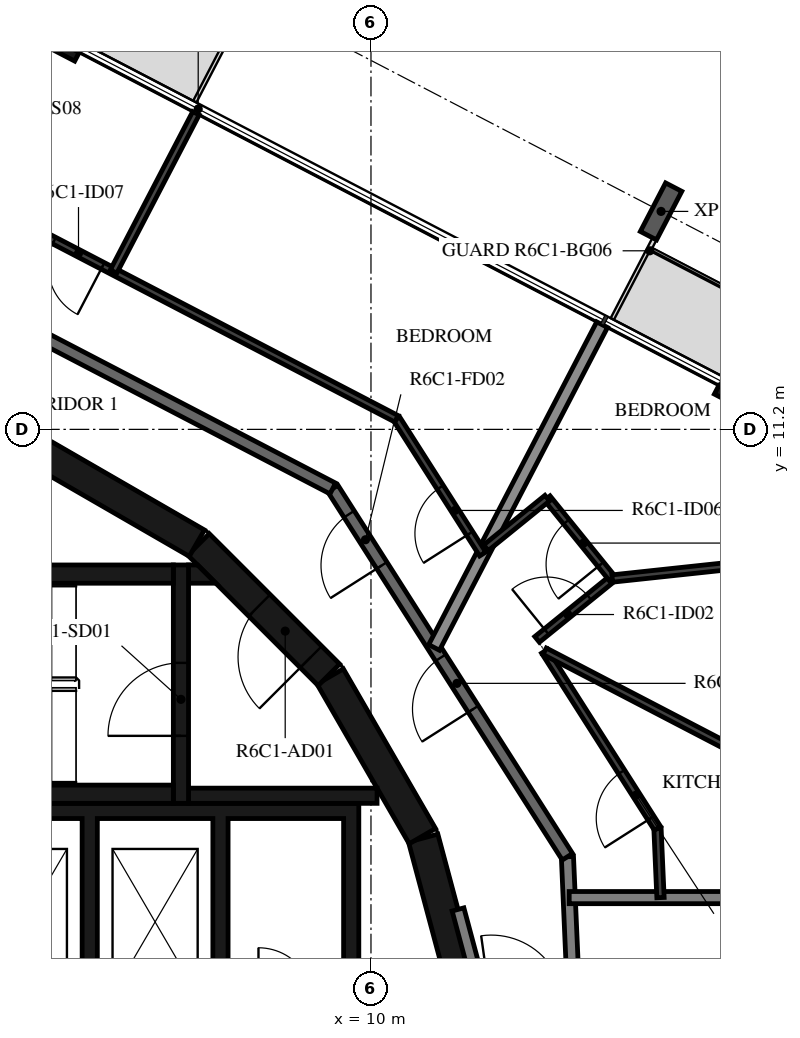
"""IFC4 building model, lengths in metres.
Left out: names, types, materials, properties, quantities, classifications, styles, units other than length and angle.
Written with IfcOpenShell. Run it as: python <this file> out.ifc"""

import sys

from ifc_helpers import new_model, si_unit, direction, frame, frame_2d, origin, origin_2d, place, context, subcontext, project, spatial, polyline, rectangle, i_section, outline, extrude, element, fill, save


model = new_model("IFC4")
c1 = context("Model", 3, precision=1e-05, world=origin(), true_north=direction((0.0, 1.0)))
c2 = subcontext(c1, "Body", "Model", "MODEL_VIEW")
j1 = project(units=[si_unit("LENGTHUNIT", "METRE"), si_unit("PLANEANGLEUNIT", "RADIAN")], contexts=[c1])
p1 = place(None, origin())
s1 = spatial("IfcSite", under=j1, at=p1, CompositionType="ELEMENT")
p2 = place(p1, origin())
s2 = spatial("IfcBuilding", under=s1, at=p2, CompositionType="ELEMENT")
p3 = place(p2, frame((0.0, 0.0, 251.2)))
s3 = spatial("IfcBuildingStorey", under=s2, at=p3, CompositionType="ELEMENT", Elevation=251.2)
p4 = place(p3, frame((14.771, 14.784, -0.38), z_axis=(0.0, 0.0, 1.0), x_axis=(0.887010710334, -0.461748849216, 0.0)))
e1 = element("IfcColumn", 1, at=p4, inside=s3, PredefinedType="COLUMN", context=c2, shape_type="SweptSolid", body=[
    extrude(i_section(OverallWidth=0.3, OverallDepth=0.9, WebThickness=0.019, FlangeThickness=0.035, FilletRadius=0.03, at=origin_2d()), origin(), (0.0, 0.0, 1.0), 3.5),
])
p5 = place(p3, frame((18.523, 10.374, 0.0), z_axis=(0.0, 0.0, 1.0), x_axis=(-0.887014349583, 0.461741858221, 0.0)))
e2 = element("IfcWall", 2, at=p5, inside=s3, PredefinedType="STANDARD", context=c2, shape_type="SweptSolid", body=[
    extrude(rectangle(XDim=3.2, YDim=0.16, at=frame_2d((1.6, 0.0))), origin(), (0.0, 0.0, 1.0), 3.12),
])
p6 = place(p5, frame((0.4, 0.0, 0.0)))
e3 = element("IfcOpeningElement", 3, at=p6, cuts=e2, PredefinedType="OPENING", context=c2, shape_type="SweptSolid", body=[
    extrude(rectangle(XDim=2.4, YDim=2.4, at=frame_2d((1.2, 1.2))), frame((0.0, 0.09, 0.0), z_axis=(0.0, -1.0, 0.0), x_axis=(1.0, 0.0, 0.0)), (0.0, 0.0, 1.0), 0.18),
])
p7 = place(p3, frame((5.164, 17.327, 0.0), z_axis=(0.0, 0.0, 1.0), x_axis=(-0.886983100078, 0.461801884119, 0.0)))
e4 = element("IfcWall", 4, at=p7, inside=s3, PredefinedType="STANDARD", context=c2, shape_type="SweptSolid", body=[
    extrude(rectangle(XDim=3.2, YDim=0.16, at=frame_2d((1.6, 0.0))), origin(), (0.0, 0.0, 1.0), 3.12),
])
p8 = place(p7, frame((0.4, 0.0, 0.0)))
e5 = element("IfcOpeningElement", 5, at=p8, cuts=e4, PredefinedType="OPENING", context=c2, shape_type="SweptSolid", body=[
    extrude(rectangle(XDim=2.4, YDim=2.4, at=frame_2d((1.2, 1.2))), frame((0.0, 0.09, 0.0), z_axis=(0.0, -1.0, 0.0), x_axis=(1.0, 0.0, 0.0)), (0.0, 0.0, 1.0), 0.18),
])
for number, where, z_axis, x_axis in (
    (6, (11.643, 1.55, 0.0), (0.0, 0.0, 1.0), (-0.259, 0.966, 0.0)),
    (7, (10.845, 4.51, 0.0), (0.0, 0.0, 1.0), (-0.5, 0.866, 0.0)),
):
    element("IfcWall", number, at=place(p3, frame(where, z_axis=z_axis, x_axis=x_axis)), inside=s3, PredefinedType="SHEAR", context=c2, shape_type="SweptSolid", body=[
        extrude(rectangle(XDim=3.033, YDim=0.5, at=frame_2d((1.516, 0.0))), origin(), (0.0, 0.0, 1.0), 3.12),
    ])
p9 = place(p3, frame((9.308, 7.164, 0.0), z_axis=(0.0, 0.0, 1.0), x_axis=(-0.707106781187, 0.707106781187, 0.0)))
e8 = element("IfcWall", 8, at=p9, inside=s3, PredefinedType="SHEAR", context=c2, shape_type="SweptSolid", body=[
    extrude(rectangle(XDim=3.032, YDim=0.5, at=frame_2d((1.516, 0.0))), origin(), (0.0, 0.0, 1.0), 3.12),
])
p10 = place(p9, frame((0.416, 0.0, 0.0)))
e9 = element("IfcOpeningElement", 9, at=p10, cuts=e8, PredefinedType="OPENING", context=c2, shape_type="SweptSolid", body=[
    extrude(rectangle(XDim=1.2, YDim=2.1, at=frame_2d((0.6, 1.05))), frame((0.0, 0.26, 0.0), z_axis=(0.0, -1.0, 0.0), x_axis=(1.0, 0.0, 0.0)), (0.0, 0.0, 1.0), 0.52),
])
p11 = place(p3, frame((7.137, 9.329, 0.0), z_axis=(0.0, 0.0, 1.0), x_axis=(-0.865975092491, 0.500087131594, 0.0)))
e10 = element("IfcWall", 10, at=p11, inside=s3, PredefinedType="SHEAR", context=c2, shape_type="SweptSolid", body=[
    extrude(rectangle(XDim=3.033, YDim=0.5, at=frame_2d((1.516, 0.0))), origin(), (0.0, 0.0, 1.0), 3.12),
])
for number, where, z_axis, x_axis in (
    (11, (0.0, 5.2, 0.0), (0.0, 0.0, 1.0), (1.0, 0.0, 0.0)),
    (12, (0.0, 8.82, 0.0), (0.0, 0.0, 1.0), (1.0, 0.0, 0.0)),
):
    element("IfcWall", number, at=place(p3, frame(where, z_axis=z_axis, x_axis=x_axis)), inside=s3, PredefinedType="SHEAR", context=c2, shape_type="SweptSolid", body=[
        extrude(rectangle(XDim=6.75, YDim=0.3, at=frame_2d((3.375, 0.0))), origin(), (0.0, 0.0, 1.0), 3.12),
    ])
p12 = place(p3, frame((6.875, 5.05, 0.0), z_axis=(0.0, 0.0, 1.0), x_axis=(0.0, 1.0, 0.0)))
e13 = element("IfcWall", 13, at=p12, inside=s3, PredefinedType="SHEAR", context=c2, shape_type="SweptSolid", body=[
    extrude(rectangle(XDim=3.92, YDim=0.25, at=frame_2d((1.96, 0.0))), origin(), (0.0, 0.0, 1.0), 3.12),
])
p13 = place(p12, frame((1.11, 0.0, 0.0)))
e14 = element("IfcOpeningElement", 14, at=p13, cuts=e13, PredefinedType="OPENING", context=c2, shape_type="SweptSolid", body=[
    extrude(rectangle(XDim=1.2, YDim=2.1, at=frame_2d((0.6, 1.05))), frame((0.0, 0.135, 0.0), z_axis=(0.0, -1.0, 0.0), x_axis=(1.0, 0.0, 0.0)), (0.0, 0.0, 1.0), 0.27),
])
p14 = place(p3, frame((7.0, 5.175, 0.0), z_axis=(0.0, 0.0, 1.0), x_axis=(1.0, 0.0, 0.0)))
e15 = element("IfcWall", 15, at=p14, inside=s3, PredefinedType="SHEAR", context=c2, shape_type="SweptSolid", body=[
    extrude(rectangle(XDim=3.1, YDim=0.25, at=frame_2d((1.55, 0.0))), origin(), (0.0, 0.0, 1.0), 3.12),
])
p15 = place(p3, origin())
e16 = element("IfcWall", 16, at=p15, inside=s3, PredefinedType="SHEAR", context=c2, shape_type="SweptSolid", body=[
    extrude(outline(polyline([(7.448, 8.67), (7.0, 8.67), (7.0, 8.97), (7.148, 8.97), (7.448, 8.67)])), origin(), (0.0, 0.0, 1.0), 3.12),
])
p16 = place(p3, origin())
e17 = element("IfcWall", 17, at=p16, inside=s3, PredefinedType="SHEAR", context=c2, shape_type="SweptSolid", body=[
    extrude(outline(polyline([(-9.55, 4.8), (-1.2, 4.8), (-1.2, 1.9), (-0.95, 1.9), (-0.95, 4.8), (0.95, 4.8), (0.95, 1.9), (1.2, 1.9), (1.2, 4.8), (3.1, 4.8), (3.1, 1.9), (3.35, 1.9), (3.35, 4.8), (5.25, 4.8), (5.25, 1.9), (5.5, 1.9), (5.5, 4.8), (7.4, 4.8), (7.4, 1.9), (7.65, 1.9), (7.65, 4.8), (9.55, 4.8), (9.55, 1.9), (9.8, 1.9), (9.8, 4.8), (9.8, 5.05), (-9.8, 5.05), (-9.8, 4.8), (-9.8, 1.9), (-9.55, 1.9), (-9.55, 4.8)])), origin(), (0.0, 0.0, 1.0), 3.12),
])
p17 = place(p3, frame((11.87, 1.668, 0.0), z_axis=(0.0, 0.0, 1.0), x_axis=(-0.258836880648, 0.965921047093, 0.0)))
e18 = element("IfcWall", 18, at=p17, inside=s3, PredefinedType="STANDARD", context=c2, shape_type="SweptSolid", body=[
    extrude(rectangle(XDim=1.695, YDim=0.2, at=frame_2d((0.848, 0.0))), origin(), (0.0, 0.0, 1.0), 3.12),
])
p18 = place(p3, frame((13.331, 1.874, 0.0), z_axis=(0.0, 0.0, 1.0), x_axis=(-0.043621457762, 0.999048131184, 0.0)))
e19 = element("IfcWall", 19, at=p18, inside=s3, PredefinedType="STANDARD", context=c2, shape_type="SweptSolid", body=[
    extrude(rectangle(XDim=2.3, YDim=0.2, at=frame_2d((1.15, 0.0))), origin(), (0.0, 0.0, 1.0), 3.12),
])
p19 = place(p3, frame((13.231, 4.172, 0.0), z_axis=(0.0, 0.0, 1.0), x_axis=(-0.537304397561, 0.843388394728, 0.0)))
e20 = element("IfcWall", 20, at=p19, inside=s3, PredefinedType="STANDARD", context=c2, shape_type="SweptSolid", body=[
    extrude(rectangle(XDim=7.181, YDim=0.2, at=frame_2d((3.59, 0.0))), origin(), (0.0, 0.0, 1.0), 3.12),
])
p20 = place(p19, frame((2.881, 0.0, 0.0)))
e21 = element("IfcOpeningElement", 21, at=p20, cuts=e20, PredefinedType="OPENING", context=c2, shape_type="SweptSolid", body=[
    extrude(rectangle(XDim=1.0, YDim=2.1, at=frame_2d((0.5, 1.05))), frame((0.0, 0.11, 0.0), z_axis=(0.0, -1.0, 0.0), x_axis=(1.0, 0.0, 0.0)), (0.0, 0.0, 1.0), 0.22),
])
p21 = place(p19, frame((5.681, 0.0, 0.0)))
e22 = element("IfcOpeningElement", 22, at=p21, cuts=e20, PredefinedType="OPENING", context=c2, shape_type="SweptSolid", body=[
    extrude(rectangle(XDim=1.0, YDim=2.1, at=frame_2d((0.5, 1.05))), frame((0.0, 0.11, 0.0), z_axis=(0.0, -1.0, 0.0), x_axis=(1.0, 0.0, 0.0)), (0.0, 0.0, 1.0), 0.22),
])
p22 = place(p3, frame((9.372, 10.228, 0.0), z_axis=(0.0, 0.0, 1.0), x_axis=(-0.887005184532, 0.461759464021, 0.0)))
e23 = element("IfcWall", 23, at=p22, inside=s3, PredefinedType="STANDARD", context=c2, shape_type="SweptSolid", body=[
    extrude(rectangle(XDim=7.181, YDim=0.2, at=frame_2d((3.591, 0.0))), origin(), (0.0, 0.0, 1.0), 3.12),
])
p23 = place(p3, frame((17.321, 3.5, 0.0), z_axis=(0.0, 0.0, 1.0), x_axis=(-1.0, 0.0, 0.0)))
e24 = element("IfcWall", 24, at=p23, inside=s3, PredefinedType="STANDARD", context=c2, shape_type="SweptSolid", body=[
    extrude(rectangle(XDim=4.061, YDim=0.2, at=frame_2d((2.03, 0.0))), origin(), (0.0, 0.0, 1.0), 3.12),
])
p24 = place(p3, frame((13.801, 12.922, 0.0), z_axis=(0.0, 0.0, 1.0), x_axis=(-0.461726485624, -0.887022351733, 0.0)))
e25 = element("IfcWall", 25, at=p24, inside=s3, PredefinedType="STANDARD", context=c2, shape_type="SweptSolid", body=[
    extrude(rectangle(XDim=5.984, YDim=0.2, at=frame_2d((2.992, 0.0))), origin(), (0.0, 0.0, 1.0), 2.73),
])
p25 = place(p3, frame((14.761, 3.5, 0.0), z_axis=(0.0, 0.0, 1.0), x_axis=(-0.04369750018, 0.999044808043, 0.0)))
e26 = element("IfcWall", 26, at=p25, inside=s3, PredefinedType="PARTITIONING", context=c2, shape_type="SweptSolid", body=[
    extrude(rectangle(XDim=1.14, YDim=0.12, at=frame_2d((0.57, 0.0))), origin(), (0.0, 0.0, 1.0), 3.12),
])
p26 = place(p3, frame((14.712, 4.639, 0.0), z_axis=(0.0, 0.0, 1.0), x_axis=(-0.537287126609, 0.843399397427, 0.0)))
e27 = element("IfcWall", 27, at=p26, inside=s3, PredefinedType="PARTITIONING", context=c2, shape_type="SweptSolid", body=[
    extrude(rectangle(XDim=3.453, YDim=0.12, at=frame_2d((1.727, 0.0))), origin(), (0.0, 0.0, 1.0), 3.12),
])
p27 = place(p26, frame((0.2, 0.0, 0.0)))
e28 = element("IfcOpeningElement", 28, at=p27, cuts=e27, PredefinedType="OPENING", context=c2, shape_type="SweptSolid", body=[
    extrude(rectangle(XDim=0.9, YDim=2.1, at=frame_2d((0.45, 1.05))), frame((0.0, 0.07, 0.0), z_axis=(0.0, -1.0, 0.0), x_axis=(1.0, 0.0, 0.0)), (0.0, 0.0, 1.0), 0.14),
])
p28 = place(p3, frame((12.732, 7.746, 0.0), z_axis=(0.0, 0.0, 1.0), x_axis=(0.777187694298, 0.62926885179, 0.0)))
e29 = element("IfcWall", 29, at=p28, inside=s3, PredefinedType="PARTITIONING", context=c2, shape_type="SweptSolid", body=[
    extrude(rectangle(XDim=1.591, YDim=0.12, at=frame_2d((0.795, 0.0))), origin(), (0.0, 0.0, 1.0), 3.12),
])
p29 = place(p28, frame((0.2, 0.0, 0.0)))
e30 = element("IfcOpeningElement", 30, at=p29, cuts=e29, PredefinedType="OPENING", context=c2, shape_type="SweptSolid", body=[
    extrude(rectangle(XDim=0.9, YDim=2.1, at=frame_2d((0.45, 1.05))), frame((0.0, 0.07, 0.0), z_axis=(0.0, -1.0, 0.0), x_axis=(1.0, 0.0, 0.0)), (0.0, 0.0, 1.0), 0.14),
])
p30 = place(p3, frame((13.969, 8.747, 0.0), z_axis=(0.0, 0.0, 1.0), x_axis=(-0.629359312443, 0.777114441921, 0.0)))
e31 = element("IfcWall", 31, at=p30, inside=s3, PredefinedType="PARTITIONING", context=c2, shape_type="SweptSolid", body=[
    extrude(rectangle(XDim=1.7, YDim=0.12, at=frame_2d((0.85, 0.0))), origin(), (0.0, 0.0, 1.0), 3.12),
])
p31 = place(p30, frame((0.3, 0.0, 0.0)))
e32 = element("IfcOpeningElement", 32, at=p31, cuts=e31, PredefinedType="OPENING", context=c2, shape_type="SweptSolid", body=[
    extrude(rectangle(XDim=0.9, YDim=2.1, at=frame_2d((0.45, 1.05))), frame((0.0, 0.07, 0.0), z_axis=(0.0, -1.0, 0.0), x_axis=(1.0, 0.0, 0.0)), (0.0, 0.0, 1.0), 0.14),
])
p32 = place(p3, frame((12.898, 10.069, 0.0), z_axis=(0.0, 0.0, 1.0), x_axis=(-0.777069405334, -0.629414918232, 0.0)))
e33 = element("IfcWall", 33, at=p32, inside=s3, PredefinedType="PARTITIONING", context=c2, shape_type="SweptSolid", body=[
    extrude(rectangle(XDim=1.296, YDim=0.12, at=frame_2d((0.648, 0.0))), origin(), (0.0, 0.0, 1.0), 3.12),
])
p33 = place(p3, frame((17.834, 4.96, 0.0), z_axis=(0.0, 0.0, 1.0), x_axis=(-0.887008743782, 0.461752626906, 0.0)))
e34 = element("IfcWall", 34, at=p33, inside=s3, PredefinedType="PARTITIONING", context=c2, shape_type="SweptSolid", body=[
    extrude(rectangle(XDim=5.612, YDim=0.12, at=frame_2d((2.806, 0.0))), origin(), (0.0, 0.0, 1.0), 3.12),
])
p34 = place(p33, frame((0.2, 0.0, 0.0)))
e35 = element("IfcOpeningElement", 35, at=p34, cuts=e34, PredefinedType="OPENING", context=c2, shape_type="SweptSolid", body=[
    extrude(rectangle(XDim=0.9, YDim=2.1, at=frame_2d((0.45, 1.05))), frame((0.0, 0.07, 0.0), z_axis=(0.0, -1.0, 0.0), x_axis=(1.0, 0.0, 0.0)), (0.0, 0.0, 1.0), 0.14),
])
p35 = place(p3, frame((20.48, 9.445, 0.0), z_axis=(0.0, 0.0, 1.0), x_axis=(-0.994311974195, -0.106506797776, 0.0)))
e36 = element("IfcWall", 36, at=p35, inside=s3, PredefinedType="PARTITIONING", context=c2, shape_type="SweptSolid", body=[
    extrude(rectangle(XDim=6.549, YDim=0.12, at=frame_2d((3.274, 0.0))), origin(), (0.0, 0.0, 1.0), 3.12),
])
p36 = place(p3, frame((11.838, 9.15, 0.0), z_axis=(0.0, 0.0, 1.0), x_axis=(-0.537288949014, 0.843398236462, 0.0)))
e37 = element("IfcWall", 37, at=p36, inside=s3, PredefinedType="PARTITIONING", context=c2, shape_type="SweptSolid", body=[
    extrude(rectangle(XDim=2.636, YDim=0.12, at=frame_2d((1.318, 0.0))), origin(), (0.0, 0.0, 1.0), 3.12),
])
p37 = place(p36, frame((0.4, 0.0, 0.0)))
e38 = element("IfcOpeningElement", 38, at=p37, cuts=e37, PredefinedType="OPENING", context=c2, shape_type="SweptSolid", body=[
    extrude(rectangle(XDim=0.9, YDim=2.1, at=frame_2d((0.45, 1.05))), frame((0.0, 0.07, 0.0), z_axis=(0.0, -1.0, 0.0), x_axis=(1.0, 0.0, 0.0)), (0.0, 0.0, 1.0), 0.14),
])
p38 = place(p3, frame((10.421, 11.373, 0.0), z_axis=(0.0, 0.0, 1.0), x_axis=(-0.887012970857, 0.461744506769, 0.0)))
e39 = element("IfcWall", 39, at=p38, inside=s3, PredefinedType="PARTITIONING", context=c2, shape_type="SweptSolid", body=[
    extrude(rectangle(XDim=7.985, YDim=0.12, at=frame_2d((3.992, 0.0))), origin(), (0.0, 0.0, 1.0), 3.12),
])
p39 = place(p38, frame((5.448, 0.0, 0.0)))
e40 = element("IfcOpeningElement", 40, at=p39, cuts=e39, PredefinedType="OPENING", context=c2, shape_type="SweptSolid", body=[
    extrude(rectangle(XDim=0.9, YDim=2.1, at=frame_2d((0.45, 1.05))), frame((0.0, 0.07, 0.0), z_axis=(0.0, -1.0, 0.0), x_axis=(1.0, 0.0, 0.0)), (0.0, 0.0, 1.0), 0.14),
])
p40 = place(p3, frame((7.122, 16.399, 0.0), z_axis=(0.0, 0.0, 1.0), x_axis=(-0.461763975246, -0.887002836053, 0.0)))
e41 = element("IfcWall", 41, at=p40, inside=s3, PredefinedType="PARTITIONING", context=c2, shape_type="SweptSolid", body=[
    extrude(rectangle(XDim=2.934, YDim=0.12, at=frame_2d((1.467, 0.0))), origin(), (0.0, 0.0, 1.0), 2.73),
])
p41 = place(p13, origin())
e42 = element("IfcDoor", 42, at=p41, inside=s3, OperationType="SINGLE_SWING_LEFT", PredefinedType="DOOR", context=c2, shape_type="SweptSolid", body=[
    extrude(rectangle(XDim=1.2, YDim=2.1, at=frame_2d((0.6, 1.05))), frame((0.0, 0.025, 0.0), z_axis=(0.0, -1.0, 0.0), x_axis=(1.0, 0.0, 0.0)), (0.0, 0.0, 1.0), 0.05),
])
fill(e14, e42)
p42 = place(p10, origin())
e43 = element("IfcDoor", 43, at=p42, inside=s3, OperationType="SINGLE_SWING_RIGHT", PredefinedType="DOOR", context=c2, shape_type="SweptSolid", body=[
    extrude(rectangle(XDim=1.2, YDim=2.1, at=frame_2d((0.6, 1.05))), frame((0.0, 0.025, 0.0), z_axis=(0.0, -1.0, 0.0), x_axis=(1.0, 0.0, 0.0)), (0.0, 0.0, 1.0), 0.05),
])
fill(e9, e43)
p43 = place(p20, origin())
e44 = element("IfcDoor", 44, at=p43, inside=s3, OperationType="SINGLE_SWING_LEFT", PredefinedType="DOOR", context=c2, shape_type="SweptSolid", body=[
    extrude(rectangle(XDim=1.0, YDim=2.1, at=frame_2d((0.5, 1.05))), frame((0.0, 0.025, 0.0), z_axis=(0.0, -1.0, 0.0), x_axis=(1.0, 0.0, 0.0)), (0.0, 0.0, 1.0), 0.05),
])
fill(e21, e44)
p44 = place(p27, origin())
e45 = element("IfcDoor", 45, at=p44, inside=s3, OperationType="SINGLE_SWING_LEFT", PredefinedType="DOOR", context=c2, shape_type="SweptSolid", body=[
    extrude(rectangle(XDim=0.9, YDim=2.1, at=frame_2d((0.45, 1.05))), frame((0.0, 0.025, 0.0), z_axis=(0.0, -1.0, 0.0), x_axis=(1.0, 0.0, 0.0)), (0.0, 0.0, 1.0), 0.05),
])
fill(e28, e45)
p45 = place(p29, origin())
e46 = element("IfcDoor", 46, at=p45, inside=s3, OperationType="SINGLE_SWING_RIGHT", PredefinedType="DOOR", context=c2, shape_type="SweptSolid", body=[
    extrude(rectangle(XDim=0.9, YDim=2.1, at=frame_2d((0.45, 1.05))), frame((0.0, 0.025, 0.0), z_axis=(0.0, -1.0, 0.0), x_axis=(1.0, 0.0, 0.0)), (0.0, 0.0, 1.0), 0.05),
])
fill(e30, e46)
p46 = place(p31, origin())
e47 = element("IfcDoor", 47, at=p46, inside=s3, OperationType="SINGLE_SWING_LEFT", PredefinedType="DOOR", context=c2, shape_type="SweptSolid", body=[
    extrude(rectangle(XDim=0.9, YDim=2.1, at=frame_2d((0.45, 1.05))), frame((0.0, 0.025, 0.0), z_axis=(0.0, -1.0, 0.0), x_axis=(1.0, 0.0, 0.0)), (0.0, 0.0, 1.0), 0.05),
])
fill(e32, e47)
p47 = place(p21, origin())
e48 = element("IfcDoor", 48, at=p47, inside=s3, OperationType="SINGLE_SWING_LEFT", PredefinedType="DOOR", context=c2, shape_type="SweptSolid", body=[
    extrude(rectangle(XDim=1.0, YDim=2.1, at=frame_2d((0.5, 1.05))), frame((0.0, 0.025, 0.0), z_axis=(0.0, -1.0, 0.0), x_axis=(1.0, 0.0, 0.0)), (0.0, 0.0, 1.0), 0.05),
])
fill(e22, e48)
p48 = place(p37, origin())
e49 = element("IfcDoor", 49, at=p48, inside=s3, OperationType="SINGLE_SWING_LEFT", PredefinedType="DOOR", context=c2, shape_type="SweptSolid", body=[
    extrude(rectangle(XDim=0.9, YDim=2.1, at=frame_2d((0.45, 1.05))), frame((0.0, 0.025, 0.0), z_axis=(0.0, -1.0, 0.0), x_axis=(1.0, 0.0, 0.0)), (0.0, 0.0, 1.0), 0.05),
])
fill(e38, e49)
p49 = place(p39, origin())
e50 = element("IfcDoor", 50, at=p49, inside=s3, OperationType="SINGLE_SWING_RIGHT", PredefinedType="DOOR", context=c2, shape_type="SweptSolid", body=[
    extrude(rectangle(XDim=0.9, YDim=2.1, at=frame_2d((0.45, 1.05))), frame((0.0, 0.025, 0.0), z_axis=(0.0, -1.0, 0.0), x_axis=(1.0, 0.0, 0.0)), (0.0, 0.0, 1.0), 0.05),
])
fill(e40, e50)
save(model, sys.argv[1])
